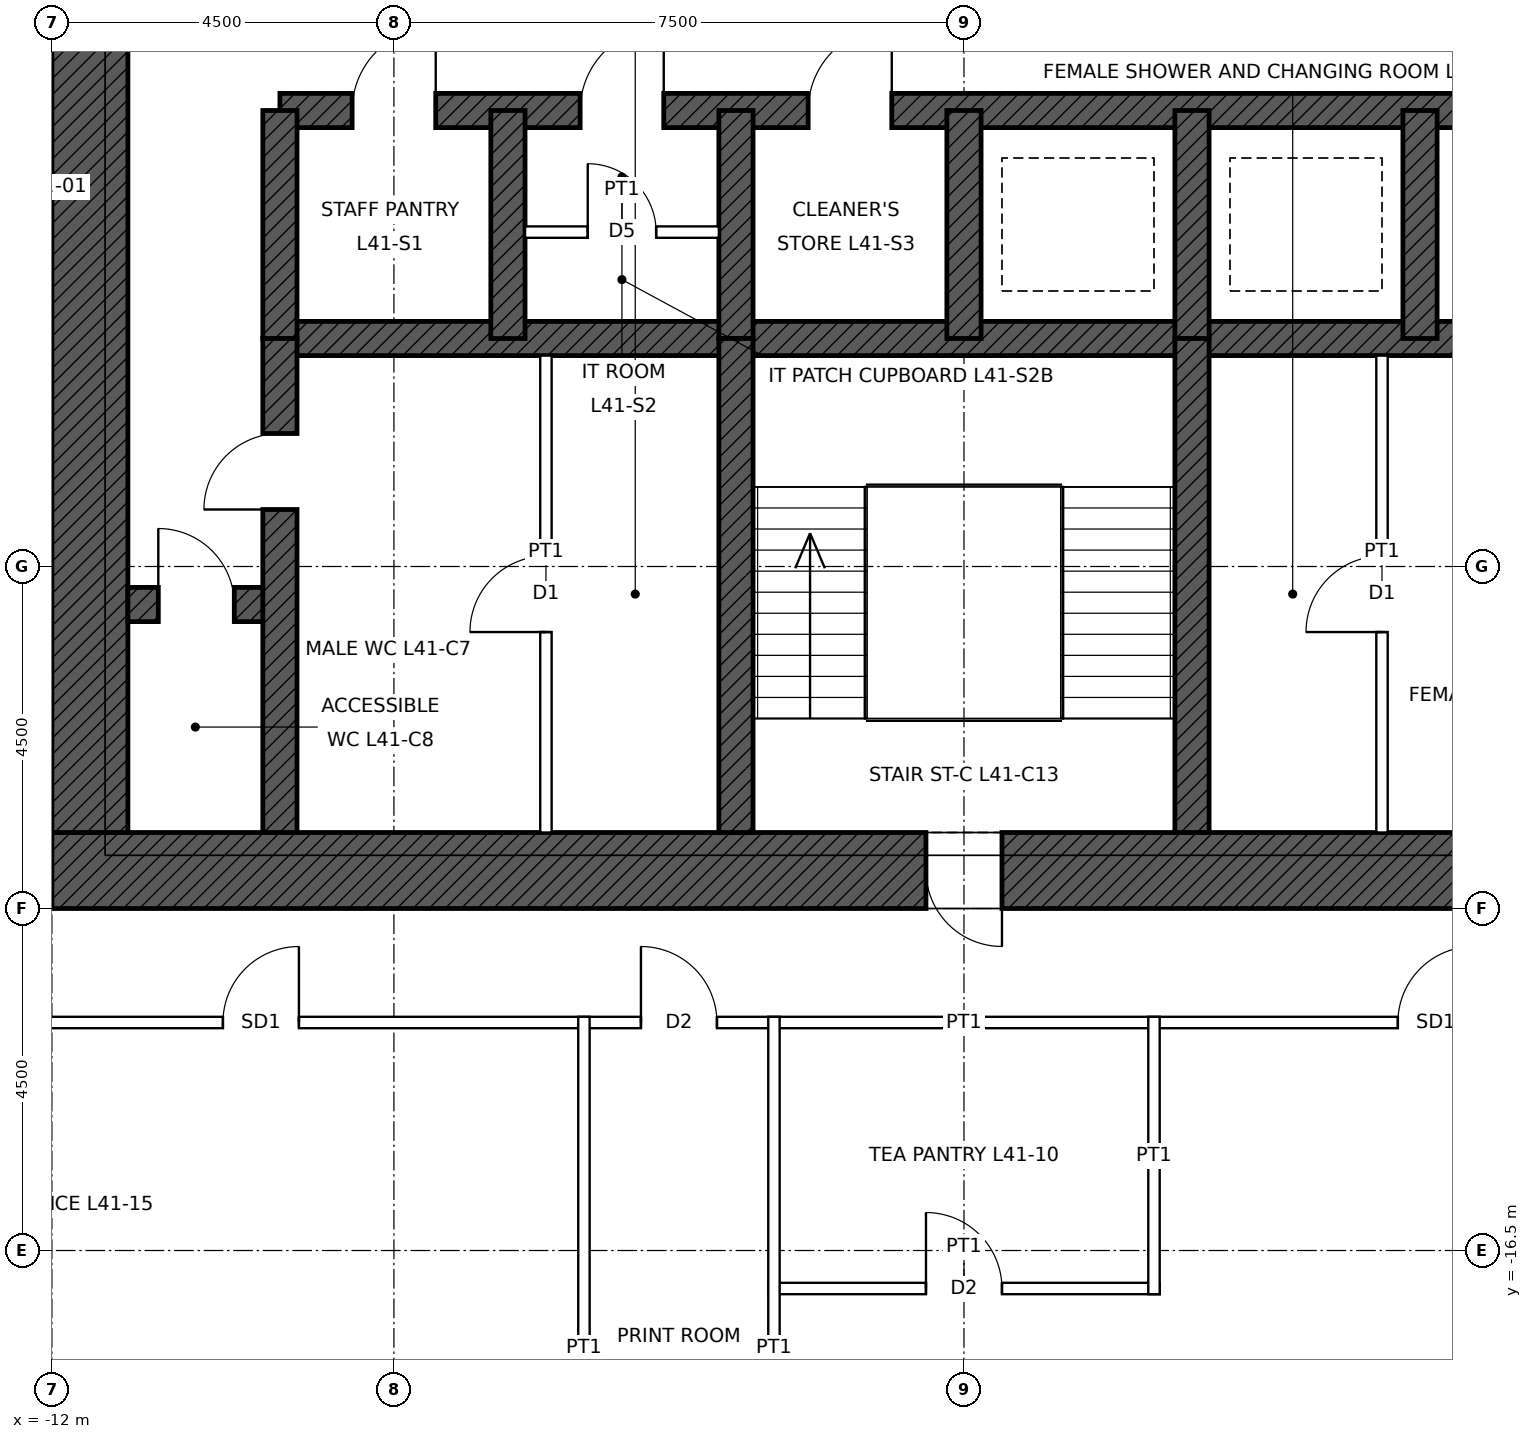
"""IFC4 building model, lengths in metres.
Left out: names, types, materials, properties, quantities, classifications, styles, units other than length and angle.
Written with IfcOpenShell. Run it as: python <this file> out.ifc"""

import sys

from ifc_helpers import new_model, si_unit, direction, frame, frame_2d, origin, place, context, subcontext, project, spatial, rectangle, extrude, element, fill, save


model = new_model("IFC4")
c1 = context("Model", 3, precision=1e-05, world=origin(), true_north=direction((0.0, 1.0)))
c2 = subcontext(c1, "Body", "Model", "MODEL_VIEW")
j1 = project(units=[si_unit("LENGTHUNIT", "METRE"), si_unit("PLANEANGLEUNIT", "RADIAN")], contexts=[c1])
p1 = place(None, origin())
s1 = spatial("IfcSite", under=j1, at=p1, CompositionType="ELEMENT")
p2 = place(p1, origin())
s2 = spatial("IfcBuilding", under=s1, at=p2, CompositionType="ELEMENT")
p3 = place(p2, frame((0.0, 0.0, 197.9)))
s3 = spatial("IfcBuildingStorey", under=s2, at=p3, CompositionType="ELEMENT", Elevation=197.9)
p4 = place(p3, frame((12.0, -11.5, 0.0), z_axis=(0.0, 0.0, 1.0), x_axis=(-1.0, 0.0, 0.0)))
e1 = element("IfcWall", 1, at=p4, inside=s3, PredefinedType="SHEAR", context=c2, shape_type="SweptSolid", body=[
    extrude(rectangle(XDim=24.0, YDim=1.0, at=frame_2d((12.0, 0.0))), origin(), (0.0, 0.0, 1.0), 4.0),
])
p5 = place(p4, frame((11.5, 0.0, 0.0)))
e2 = element("IfcOpeningElement", 2, at=p5, cuts=e1, PredefinedType="OPENING", context=c2, shape_type="SweptSolid", body=[
    extrude(rectangle(XDim=1.0, YDim=2.1, at=frame_2d((0.5, 1.05))), frame((0.0, 0.51, 0.0), z_axis=(0.0, -1.0, 0.0), x_axis=(1.0, 0.0, 0.0)), (0.0, 0.0, 1.0), 1.02),
])
p6 = place(p4, frame((1.0, 0.0, 0.0)))
e3 = element("IfcOpeningElement", 3, at=p6, cuts=e1, PredefinedType="OPENING", context=c2, shape_type="SweptSolid", body=[
    extrude(rectangle(XDim=1.0, YDim=2.4, at=frame_2d((0.5, 1.2))), frame((0.0, 0.51, 0.0), z_axis=(0.0, -1.0, 0.0), x_axis=(1.0, 0.0, 0.0)), (0.0, 0.0, 1.0), 1.02),
])
p7 = place(p3, frame((-11.5, -11.0, 0.0), z_axis=(0.0, 0.0, 1.0), x_axis=(0.0, 1.0, 0.0)))
e4 = element("IfcWall", 4, at=p7, inside=s3, PredefinedType="SHEAR", context=c2, shape_type="SweptSolid", body=[
    extrude(rectangle(XDim=22.0, YDim=1.0, at=frame_2d((11.0, 0.0))), origin(), (0.0, 0.0, 1.0), 4.0),
])
p8 = place(p7, frame((10.5, 0.0, 0.0)))
e5 = element("IfcOpeningElement", 5, at=p8, cuts=e4, PredefinedType="OPENING", context=c2, shape_type="SweptSolid", body=[
    extrude(rectangle(XDim=1.0, YDim=2.4, at=frame_2d((0.5, 1.2))), frame((0.0, 0.51, 0.0), z_axis=(0.0, -1.0, 0.0), x_axis=(1.0, 0.0, 0.0)), (0.0, 0.0, 1.0), 1.02),
])
p9 = place(p3, frame((-9.0, -1.5, 0.0), z_axis=(0.0, 0.0, 1.0), x_axis=(1.0, 0.0, 0.0)))
e6 = element("IfcWall", 6, at=p9, inside=s3, PredefinedType="SHEAR", context=c2, shape_type="SweptSolid", body=[
    extrude(rectangle(XDim=18.0, YDim=0.45, at=frame_2d((9.0, 0.0))), origin(), (0.0, 0.0, 1.0), 4.0),
])
p10 = place(p9, frame((0.95, 0.0, 0.0)))
e7 = element("IfcOpeningElement", 7, at=p10, cuts=e6, PredefinedType="OPENING", context=c2, shape_type="SweptSolid", body=[
    extrude(rectangle(XDim=1.1, YDim=2.1, at=frame_2d((0.55, 1.05))), frame((0.0, 0.235, 0.0), z_axis=(0.0, -1.0, 0.0), x_axis=(1.0, 0.0, 0.0)), (0.0, 0.0, 1.0), 0.47),
])
p11 = place(p9, frame((3.95, 0.0, 0.0)))
e8 = element("IfcOpeningElement", 8, at=p11, cuts=e6, PredefinedType="OPENING", context=c2, shape_type="SweptSolid", body=[
    extrude(rectangle(XDim=1.1, YDim=2.1, at=frame_2d((0.55, 1.05))), frame((0.0, 0.235, 0.0), z_axis=(0.0, -1.0, 0.0), x_axis=(1.0, 0.0, 0.0)), (0.0, 0.0, 1.0), 0.47),
])
p12 = place(p9, frame((6.95, 0.0, 0.0)))
e9 = element("IfcOpeningElement", 9, at=p12, cuts=e6, PredefinedType="OPENING", context=c2, shape_type="SweptSolid", body=[
    extrude(rectangle(XDim=1.1, YDim=2.1, at=frame_2d((0.55, 1.05))), frame((0.0, 0.235, 0.0), z_axis=(0.0, -1.0, 0.0), x_axis=(1.0, 0.0, 0.0)), (0.0, 0.0, 1.0), 0.47),
])
p13 = place(p3, frame((-9.0, -4.5, 0.0), z_axis=(0.0, 0.0, 1.0), x_axis=(1.0, 0.0, 0.0)))
e10 = element("IfcWall", 10, at=p13, inside=s3, PredefinedType="SHEAR", context=c2, shape_type="SweptSolid", body=[
    extrude(rectangle(XDim=18.0, YDim=0.45, at=frame_2d((9.0, 0.0))), origin(), (0.0, 0.0, 1.0), 4.0),
])
p14 = place(p3, frame((-11.0, -8.0, 0.0), z_axis=(0.0, 0.0, 1.0), x_axis=(1.0, 0.0, 0.0)))
e11 = element("IfcWall", 11, at=p14, inside=s3, PredefinedType="SHEAR", context=c2, shape_type="SweptSolid", body=[
    extrude(rectangle(XDim=2.0, YDim=0.45, at=frame_2d((1.0, 0.0))), origin(), (0.0, 0.0, 1.0), 4.0),
])
p15 = place(p14, frame((0.4, 0.0, 0.0)))
e12 = element("IfcOpeningElement", 12, at=p15, cuts=e11, PredefinedType="OPENING", context=c2, shape_type="SweptSolid", body=[
    extrude(rectangle(XDim=1.0, YDim=2.1, at=frame_2d((0.5, 1.05))), frame((0.0, 0.235, 0.0), z_axis=(0.0, -1.0, 0.0), x_axis=(1.0, 0.0, 0.0)), (0.0, 0.0, 1.0), 0.47),
])
for number, where, z_axis, x_axis in (
    (13, (-9.0, -4.5, 0.0), (0.0, 0.0, 1.0), (0.0, 1.0, 0.0)),
    (14, (-6.0, -4.5, 0.0), (0.0, 0.0, 1.0), (0.0, 1.0, 0.0)),
    (15, (-3.0, -4.5, 0.0), (0.0, 0.0, 1.0), (0.0, 1.0, 0.0)),
    (16, (0.0, -4.5, 0.0), (0.0, 0.0, 1.0), (0.0, 1.0, 0.0)),
    (17, (3.0, -4.5, 0.0), (0.0, 0.0, 1.0), (0.0, 1.0, 0.0)),
    (18, (6.0, -4.5, 0.0), (0.0, 0.0, 1.0), (0.0, 1.0, 0.0)),
):
    element("IfcWall", number, at=place(p3, frame(where, z_axis=z_axis, x_axis=x_axis)), inside=s3, PredefinedType="SHEAR", context=c2, shape_type="SweptSolid", body=[
        extrude(rectangle(XDim=3.0, YDim=0.45, at=frame_2d((1.5, 0.0))), origin(), (0.0, 0.0, 1.0), 4.0),
    ])
p16 = place(p3, frame((-9.0, -11.0, 0.0), z_axis=(0.0, 0.0, 1.0), x_axis=(0.0, 1.0, 0.0)))
e19 = element("IfcWall", 19, at=p16, inside=s3, PredefinedType="SHEAR", context=c2, shape_type="SweptSolid", body=[
    extrude(rectangle(XDim=6.5, YDim=0.45, at=frame_2d((3.25, 0.0))), origin(), (0.0, 0.0, 1.0), 4.0),
])
p17 = place(p16, frame((4.25, 0.0, 0.0)))
e20 = element("IfcOpeningElement", 20, at=p17, cuts=e19, PredefinedType="OPENING", context=c2, shape_type="SweptSolid", body=[
    extrude(rectangle(XDim=1.0, YDim=2.1, at=frame_2d((0.5, 1.05))), frame((0.0, 0.235, 0.0), z_axis=(0.0, -1.0, 0.0), x_axis=(1.0, 0.0, 0.0)), (0.0, 0.0, 1.0), 0.47),
])
for number, where, z_axis, x_axis in (
    (21, (-3.0, -11.0, 0.0), (0.0, 0.0, 1.0), (0.0, 1.0, 0.0)),
    (22, (3.0, -11.0, 0.0), (0.0, 0.0, 1.0), (0.0, 1.0, 0.0)),
):
    element("IfcWall", number, at=place(p3, frame(where, z_axis=z_axis, x_axis=x_axis)), inside=s3, PredefinedType="SHEAR", context=c2, shape_type="SweptSolid", body=[
        extrude(rectangle(XDim=6.5, YDim=0.45, at=frame_2d((3.25, 0.0))), origin(), (0.0, 0.0, 1.0), 4.0),
    ])
p18 = place(p3, frame((-2.575, -17.0, 0.0), z_axis=(0.0, 0.0, 1.0), x_axis=(1.0, 0.0, 0.0)))
e23 = element("IfcWall", 23, at=p18, inside=s3, PredefinedType="PARTITIONING", context=c2, shape_type="SweptSolid", body=[
    extrude(rectangle(XDim=5.15, YDim=0.15, at=frame_2d((2.575, 0.0))), origin(), (0.0, 0.0, 1.0), 3.85),
])
p19 = place(p18, frame((2.075, 0.0, 0.0)))
e24 = element("IfcOpeningElement", 24, at=p19, cuts=e23, PredefinedType="OPENING", context=c2, shape_type="SweptSolid", body=[
    extrude(rectangle(XDim=1.0, YDim=2.1, at=frame_2d((0.5, 1.05))), frame((0.0, 0.085, 0.0), z_axis=(0.0, -1.0, 0.0), x_axis=(1.0, 0.0, 0.0)), (0.0, 0.0, 1.0), 0.17),
])
p20 = place(p3, frame((-13.575, -13.5, 0.0), z_axis=(0.0, 0.0, 1.0), x_axis=(1.0, 0.0, 0.0)))
e25 = element("IfcWall", 25, at=p20, inside=s3, PredefinedType="PARTITIONING", context=c2, shape_type="SweptSolid", body=[
    extrude(rectangle(XDim=27.15, YDim=0.15, at=frame_2d((13.575, 0.0))), origin(), (0.0, 0.0, 1.0), 3.85),
])
p21 = place(p20, frame((19.283, 0.0, 0.0)))
e26 = element("IfcOpeningElement", 26, at=p21, cuts=e25, PredefinedType="OPENING", context=c2, shape_type="SweptSolid", body=[
    extrude(rectangle(XDim=1.0, YDim=2.4, at=frame_2d((0.5, 1.2))), frame((0.0, 0.085, 0.0), z_axis=(0.0, -1.0, 0.0), x_axis=(1.0, 0.0, 0.0)), (0.0, 0.0, 1.0), 0.17),
])
p22 = place(p20, frame((9.325, 0.0, 0.0)))
e27 = element("IfcOpeningElement", 27, at=p22, cuts=e25, PredefinedType="OPENING", context=c2, shape_type="SweptSolid", body=[
    extrude(rectangle(XDim=1.0, YDim=2.1, at=frame_2d((0.5, 1.05))), frame((0.0, 0.085, 0.0), z_axis=(0.0, -1.0, 0.0), x_axis=(1.0, 0.0, 0.0)), (0.0, 0.0, 1.0), 0.17),
])
p23 = place(p20, frame((3.825, 0.0, 0.0)))
e28 = element("IfcOpeningElement", 28, at=p23, cuts=e25, PredefinedType="OPENING", context=c2, shape_type="SweptSolid", body=[
    extrude(rectangle(XDim=1.0, YDim=2.4, at=frame_2d((0.5, 1.2))), frame((0.0, 0.085, 0.0), z_axis=(0.0, -1.0, 0.0), x_axis=(1.0, 0.0, 0.0)), (0.0, 0.0, 1.0), 0.17),
])
p24 = place(p20, frame((25.318, 0.0, 0.0)))
e29 = element("IfcOpeningElement", 29, at=p24, cuts=e25, PredefinedType="OPENING", context=c2, shape_type="SweptSolid", body=[
    extrude(rectangle(XDim=1.0, YDim=2.4, at=frame_2d((0.5, 1.2))), frame((0.0, 0.085, 0.0), z_axis=(0.0, -1.0, 0.0), x_axis=(1.0, 0.0, 0.0)), (0.0, 0.0, 1.0), 0.17),
])
for number, where, z_axis, x_axis in (
    (30, (-5.0, -22.15, 0.0), (0.0, 0.0, 1.0), (0.0, 1.0, 0.0)),
    (31, (-2.5, -22.15, 0.0), (0.0, 0.0, 1.0), (0.0, 1.0, 0.0)),
):
    element("IfcWall", number, at=place(p3, frame(where, z_axis=z_axis, x_axis=x_axis)), inside=s3, PredefinedType="PARTITIONING", context=c2, shape_type="SweptSolid", body=[
        extrude(rectangle(XDim=8.725, YDim=0.15, at=frame_2d((4.362, 0.0))), origin(), (0.0, 0.0, 1.0), 3.85),
    ])
p25 = place(p3, frame((2.5, -17.075, 0.0), z_axis=(0.0, 0.0, 1.0), x_axis=(0.0, 1.0, 0.0)))
e32 = element("IfcWall", 32, at=p25, inside=s3, PredefinedType="PARTITIONING", context=c2, shape_type="SweptSolid", body=[
    extrude(rectangle(XDim=3.65, YDim=0.15, at=frame_2d((1.825, 0.0))), origin(), (0.0, 0.0, 1.0), 3.85),
])
p26 = place(p3, frame((-5.5, -11.0, 0.0), z_axis=(0.0, 0.0, 1.0), x_axis=(0.0, 1.0, 0.0)))
e33 = element("IfcWall", 33, at=p26, inside=s3, PredefinedType="PARTITIONING", context=c2, shape_type="SweptSolid", body=[
    extrude(rectangle(XDim=6.275, YDim=0.15, at=frame_2d((3.137, 0.0))), origin(), (0.0, 0.0, 1.0), 3.75),
])
p27 = place(p26, frame((2.637, 0.0, 0.0)))
e34 = element("IfcOpeningElement", 34, at=p27, cuts=e33, PredefinedType="OPENING", context=c2, shape_type="SweptSolid", body=[
    extrude(rectangle(XDim=1.0, YDim=2.1, at=frame_2d((0.5, 1.05))), frame((0.0, 0.085, 0.0), z_axis=(0.0, -1.0, 0.0), x_axis=(1.0, 0.0, 0.0)), (0.0, 0.0, 1.0), 0.17),
])
p28 = place(p3, frame((5.5, -11.0, 0.0), z_axis=(0.0, 0.0, 1.0), x_axis=(0.0, 1.0, 0.0)))
e35 = element("IfcWall", 35, at=p28, inside=s3, PredefinedType="PARTITIONING", context=c2, shape_type="SweptSolid", body=[
    extrude(rectangle(XDim=6.275, YDim=0.15, at=frame_2d((3.137, 0.0))), origin(), (0.0, 0.0, 1.0), 3.75),
])
p29 = place(p28, frame((2.637, 0.0, 0.0)))
e36 = element("IfcOpeningElement", 36, at=p29, cuts=e35, PredefinedType="OPENING", context=c2, shape_type="SweptSolid", body=[
    extrude(rectangle(XDim=1.0, YDim=2.1, at=frame_2d((0.5, 1.05))), frame((0.0, 0.085, 0.0), z_axis=(0.0, -1.0, 0.0), x_axis=(1.0, 0.0, 0.0)), (0.0, 0.0, 1.0), 0.17),
])
p30 = place(p3, frame((-5.775, -3.1, 0.0), z_axis=(0.0, 0.0, 1.0), x_axis=(1.0, 0.0, 0.0)))
e37 = element("IfcWall", 37, at=p30, inside=s3, PredefinedType="PARTITIONING", context=c2, shape_type="SweptSolid", body=[
    extrude(rectangle(XDim=2.55, YDim=0.15, at=frame_2d((1.275, 0.0))), origin(), (0.0, 0.0, 1.0), 3.75),
])
p31 = place(p30, frame((0.825, 0.0, 0.0)))
e38 = element("IfcOpeningElement", 38, at=p31, cuts=e37, PredefinedType="OPENING", context=c2, shape_type="SweptSolid", body=[
    extrude(rectangle(XDim=0.9, YDim=2.1, at=frame_2d((0.45, 1.05))), frame((0.0, 0.085, 0.0), z_axis=(0.0, -1.0, 0.0), x_axis=(1.0, 0.0, 0.0)), (0.0, 0.0, 1.0), 0.17),
])
p32 = place(p5, origin())
e39 = element("IfcDoor", 39, at=p32, inside=s3, OperationType="SINGLE_SWING_LEFT", PredefinedType="DOOR", context=c2, shape_type="SweptSolid", body=[
    extrude(rectangle(XDim=1.0, YDim=2.1, at=frame_2d((0.5, 1.05))), frame((0.0, 0.485, 0.0), z_axis=(0.0, -1.0, 0.0), x_axis=(1.0, 0.0, 0.0)), (0.0, 0.0, 1.0), 0.05),
])
fill(e2, e39)
p33 = place(p17, origin())
e40 = element("IfcDoor", 40, at=p33, inside=s3, OperationType="SINGLE_SWING_LEFT", PredefinedType="DOOR", context=c2, shape_type="SweptSolid", body=[
    extrude(rectangle(XDim=1.0, YDim=2.1, at=frame_2d((0.5, 1.05))), frame((0.0, 0.025, 0.0), z_axis=(0.0, -1.0, 0.0), x_axis=(1.0, 0.0, 0.0)), (0.0, 0.0, 1.0), 0.05),
])
fill(e20, e40)
p34 = place(p15, origin())
e41 = element("IfcDoor", 41, at=p34, inside=s3, OperationType="SINGLE_SWING_LEFT", PredefinedType="DOOR", context=c2, shape_type="SweptSolid", body=[
    extrude(rectangle(XDim=1.0, YDim=2.1, at=frame_2d((0.5, 1.05))), frame((0.0, 0.025, 0.0), z_axis=(0.0, -1.0, 0.0), x_axis=(1.0, 0.0, 0.0)), (0.0, 0.0, 1.0), 0.05),
])
fill(e12, e41)
p35 = place(p27, origin())
e42 = element("IfcDoor", 42, at=p35, inside=s3, OperationType="SINGLE_SWING_LEFT", PredefinedType="DOOR", context=c2, shape_type="SweptSolid", body=[
    extrude(rectangle(XDim=1.0, YDim=2.1, at=frame_2d((0.5, 1.05))), frame((0.0, 0.025, 0.0), z_axis=(0.0, -1.0, 0.0), x_axis=(1.0, 0.0, 0.0)), (0.0, 0.0, 1.0), 0.05),
])
fill(e34, e42)
p36 = place(p29, origin())
e43 = element("IfcDoor", 43, at=p36, inside=s3, OperationType="SINGLE_SWING_LEFT", PredefinedType="DOOR", context=c2, shape_type="SweptSolid", body=[
    extrude(rectangle(XDim=1.0, YDim=2.1, at=frame_2d((0.5, 1.05))), frame((0.0, 0.025, 0.0), z_axis=(0.0, -1.0, 0.0), x_axis=(1.0, 0.0, 0.0)), (0.0, 0.0, 1.0), 0.05),
])
fill(e36, e43)
p37 = place(p10, origin())
e44 = element("IfcDoor", 44, at=p37, inside=s3, OperationType="SINGLE_SWING_RIGHT", PredefinedType="DOOR", context=c2, shape_type="SweptSolid", body=[
    extrude(rectangle(XDim=1.1, YDim=2.1, at=frame_2d((0.55, 1.05))), frame((0.0, 0.025, 0.0), z_axis=(0.0, -1.0, 0.0), x_axis=(1.0, 0.0, 0.0)), (0.0, 0.0, 1.0), 0.05),
])
fill(e7, e44)
p38 = place(p11, origin())
e45 = element("IfcDoor", 45, at=p38, inside=s3, OperationType="SINGLE_SWING_RIGHT", PredefinedType="DOOR", context=c2, shape_type="SweptSolid", body=[
    extrude(rectangle(XDim=1.1, YDim=2.1, at=frame_2d((0.55, 1.05))), frame((0.0, 0.025, 0.0), z_axis=(0.0, -1.0, 0.0), x_axis=(1.0, 0.0, 0.0)), (0.0, 0.0, 1.0), 0.05),
])
fill(e8, e45)
p39 = place(p31, origin())
e46 = element("IfcDoor", 46, at=p39, inside=s3, OperationType="SINGLE_SWING_LEFT", PredefinedType="DOOR", context=c2, shape_type="SweptSolid", body=[
    extrude(rectangle(XDim=0.9, YDim=2.1, at=frame_2d((0.45, 1.05))), frame((0.0, 0.025, 0.0), z_axis=(0.0, -1.0, 0.0), x_axis=(1.0, 0.0, 0.0)), (0.0, 0.0, 1.0), 0.05),
])
fill(e38, e46)
p40 = place(p12, origin())
e47 = element("IfcDoor", 47, at=p40, inside=s3, OperationType="SINGLE_SWING_RIGHT", PredefinedType="DOOR", context=c2, shape_type="SweptSolid", body=[
    extrude(rectangle(XDim=1.1, YDim=2.1, at=frame_2d((0.55, 1.05))), frame((0.0, 0.025, 0.0), z_axis=(0.0, -1.0, 0.0), x_axis=(1.0, 0.0, 0.0)), (0.0, 0.0, 1.0), 0.05),
])
fill(e9, e47)
p41 = place(p21, origin())
e48 = element("IfcDoor", 48, at=p41, inside=s3, OperationType="SINGLE_SWING_RIGHT", PredefinedType="DOOR", context=c2, shape_type="SweptSolid", body=[
    extrude(rectangle(XDim=1.0, YDim=2.4, at=frame_2d((0.5, 1.2))), frame((0.0, 0.025, 0.0), z_axis=(0.0, -1.0, 0.0), x_axis=(1.0, 0.0, 0.0)), (0.0, 0.0, 1.0), 0.05),
])
fill(e26, e48)
p42 = place(p19, origin())
e49 = element("IfcDoor", 49, at=p42, inside=s3, OperationType="SINGLE_SWING_LEFT", PredefinedType="DOOR", context=c2, shape_type="SweptSolid", body=[
    extrude(rectangle(XDim=1.0, YDim=2.1, at=frame_2d((0.5, 1.05))), frame((0.0, 0.025, 0.0), z_axis=(0.0, -1.0, 0.0), x_axis=(1.0, 0.0, 0.0)), (0.0, 0.0, 1.0), 0.05),
])
fill(e24, e49)
p43 = place(p22, origin())
e50 = element("IfcDoor", 50, at=p43, inside=s3, OperationType="SINGLE_SWING_LEFT", PredefinedType="DOOR", context=c2, shape_type="SweptSolid", body=[
    extrude(rectangle(XDim=1.0, YDim=2.1, at=frame_2d((0.5, 1.05))), frame((0.0, 0.025, 0.0), z_axis=(0.0, -1.0, 0.0), x_axis=(1.0, 0.0, 0.0)), (0.0, 0.0, 1.0), 0.05),
])
fill(e27, e50)
p44 = place(p23, origin())
e51 = element("IfcDoor", 51, at=p44, inside=s3, OperationType="SINGLE_SWING_RIGHT", PredefinedType="DOOR", context=c2, shape_type="SweptSolid", body=[
    extrude(rectangle(XDim=1.0, YDim=2.4, at=frame_2d((0.5, 1.2))), frame((0.0, 0.025, 0.0), z_axis=(0.0, -1.0, 0.0), x_axis=(1.0, 0.0, 0.0)), (0.0, 0.0, 1.0), 0.05),
])
fill(e28, e51)
save(model, sys.argv[1])
